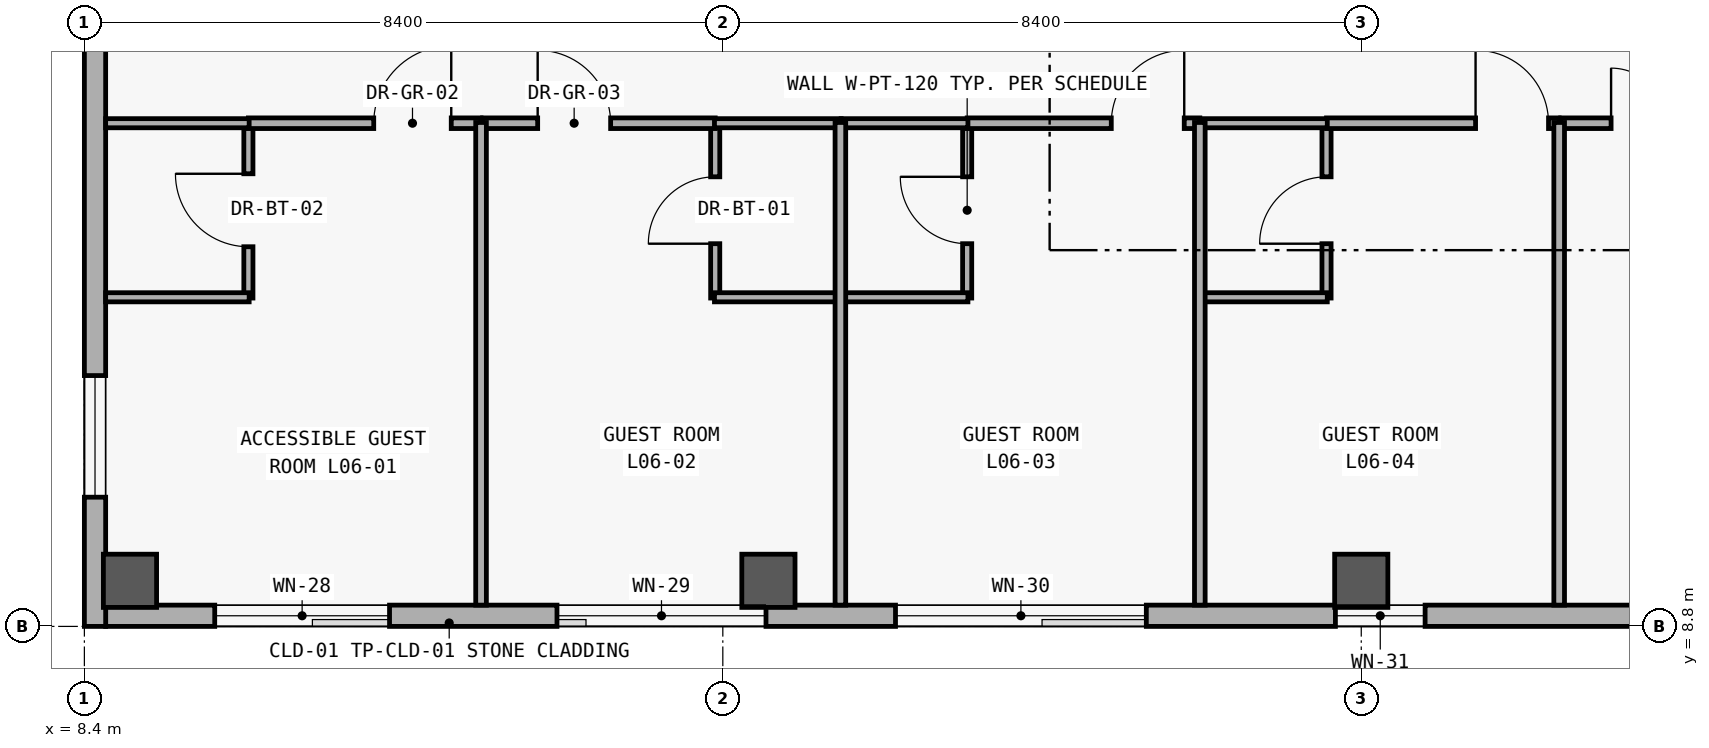
"""IFC4 building model, lengths in metres.
Left out: names, types, materials, properties, quantities, classifications, styles, units other than length and angle.
Written with IfcOpenShell. Run it as: python <this file> out.ifc"""

import sys

from ifc_helpers import new_model, si_unit, direction, frame, frame_2d, origin, origin_2d, place, context, subcontext, project, spatial, rectangle, extrude, element, fill, save


model = new_model("IFC4")
c1 = context("Model", 3, precision=1e-05, world=origin(), true_north=direction((0.0, 1.0)))
c2 = subcontext(c1, "Body", "Model", "MODEL_VIEW")
j1 = project(units=[si_unit("LENGTHUNIT", "METRE"), si_unit("PLANEANGLEUNIT", "RADIAN")], contexts=[c1])
p1 = place(None, origin())
s1 = spatial("IfcSite", under=j1, at=p1, CompositionType="ELEMENT")
p2 = place(p1, origin())
s2 = spatial("IfcBuilding", under=s1, at=p2, CompositionType="ELEMENT")
p3 = place(p2, frame((0.0, 0.0, 26.4)))
s3 = spatial("IfcBuildingStorey", under=s2, at=p3, CompositionType="ELEMENT", Elevation=26.4)
for number, where, z_axis, x_axis in (
    (1, (9.0, 9.4, 0.0), (0.0, 0.0, 1.0), (1.0, 0.0, 0.0)),
    (2, (17.4, 9.4, 0.0), (0.0, 0.0, 1.0), (1.0, 0.0, 0.0)),
    (3, (25.2, 9.4, 0.0), (0.0, 0.0, 1.0), (1.0, 0.0, 0.0)),
):
    element("IfcColumn", number, at=place(p3, frame(where, z_axis=z_axis, x_axis=x_axis)), inside=s3, PredefinedType="COLUMN", context=c2, shape_type="SweptSolid", body=[
        extrude(rectangle(XDim=0.7, YDim=0.7, at=origin_2d()), origin(), (0.0, 0.0, 1.0), 3.6),
    ])
p4 = place(p3, frame((75.32, 8.94, 0.0), z_axis=(0.0, 0.0, 1.0), x_axis=(-1.0, 0.0, 0.0)))
e4 = element("IfcWall", 4, at=p4, inside=s3, PredefinedType="SOLIDWALL", context=c2, shape_type="SweptSolid", body=[
    extrude(rectangle(XDim=66.64, YDim=0.28, at=frame_2d((33.32, 0.0))), origin(), (0.0, 0.0, 1.0), 3.32),
])
p5 = place(p4, frame((62.905, 0.0, 0.85)))
e5 = element("IfcOpeningElement", 5, at=p5, cuts=e4, PredefinedType="OPENING", context=c2, shape_type="SweptSolid", body=[
    extrude(rectangle(XDim=2.3, YDim=2.05, at=frame_2d((1.15, 1.025))), frame((0.0, 0.15, 0.0), z_axis=(0.0, -1.0, 0.0), x_axis=(1.0, 0.0, 0.0)), (0.0, 0.0, 1.0), 0.3),
])
p6 = place(p4, frame((57.952, 0.0, 0.85)))
e6 = element("IfcOpeningElement", 6, at=p6, cuts=e4, PredefinedType="OPENING", context=c2, shape_type="SweptSolid", body=[
    extrude(rectangle(XDim=2.75, YDim=2.1, at=frame_2d((1.375, 1.05))), frame((0.0, 0.15, 0.0), z_axis=(0.0, -1.0, 0.0), x_axis=(1.0, 0.0, 0.0)), (0.0, 0.0, 1.0), 0.3),
])
p7 = place(p4, frame((52.948, 0.0, 0.85)))
e7 = element("IfcOpeningElement", 7, at=p7, cuts=e4, PredefinedType="OPENING", context=c2, shape_type="SweptSolid", body=[
    extrude(rectangle(XDim=3.3, YDim=2.15, at=frame_2d((1.65, 1.075))), frame((0.0, 0.15, 0.0), z_axis=(0.0, -1.0, 0.0), x_axis=(1.0, 0.0, 0.0)), (0.0, 0.0, 1.0), 0.3),
])
p8 = place(p4, frame((49.28, 0.0, 0.85)))
e8 = element("IfcOpeningElement", 8, at=p8, cuts=e4, PredefinedType="OPENING", context=c2, shape_type="SweptSolid", body=[
    extrude(rectangle(XDim=1.18, YDim=1.5, at=frame_2d((0.59, 0.75))), frame((0.0, 0.15, 0.0), z_axis=(0.0, -1.0, 0.0), x_axis=(1.0, 0.0, 0.0)), (0.0, 0.0, 1.0), 0.3),
])
p9 = place(p4, frame((44.501, 0.0, 0.85)))
e9 = element("IfcOpeningElement", 9, at=p9, cuts=e4, PredefinedType="OPENING", context=c2, shape_type="SweptSolid", body=[
    extrude(rectangle(XDim=1.28, YDim=1.6, at=frame_2d((0.64, 0.8))), frame((0.0, 0.15, 0.0), z_axis=(0.0, -1.0, 0.0), x_axis=(1.0, 0.0, 0.0)), (0.0, 0.0, 1.0), 0.3),
])
p10 = place(p4, frame((39.723, 0.0, 0.85)))
e10 = element("IfcOpeningElement", 10, at=p10, cuts=e4, PredefinedType="OPENING", context=c2, shape_type="SweptSolid", body=[
    extrude(rectangle(XDim=1.38, YDim=1.7, at=frame_2d((0.69, 0.85))), frame((0.0, 0.15, 0.0), z_axis=(0.0, -1.0, 0.0), x_axis=(1.0, 0.0, 0.0)), (0.0, 0.0, 1.0), 0.3),
])
p11 = place(p4, frame((34.944, 0.0, 0.85)))
e11 = element("IfcOpeningElement", 11, at=p11, cuts=e4, PredefinedType="OPENING", context=c2, shape_type="SweptSolid", body=[
    extrude(rectangle(XDim=1.48, YDim=1.8, at=frame_2d((0.74, 0.9))), frame((0.0, 0.15, 0.0), z_axis=(0.0, -1.0, 0.0), x_axis=(1.0, 0.0, 0.0)), (0.0, 0.0, 1.0), 0.3),
])
p12 = place(p4, frame((30.165, 0.0, 0.85)))
e12 = element("IfcOpeningElement", 12, at=p12, cuts=e4, PredefinedType="OPENING", context=c2, shape_type="SweptSolid", body=[
    extrude(rectangle(XDim=1.58, YDim=1.85, at=frame_2d((0.79, 0.925))), frame((0.0, 0.15, 0.0), z_axis=(0.0, -1.0, 0.0), x_axis=(1.0, 0.0, 0.0)), (0.0, 0.0, 1.0), 0.3),
])
p13 = place(p4, frame((25.387, 0.0, 0.85)))
e13 = element("IfcOpeningElement", 13, at=p13, cuts=e4, PredefinedType="OPENING", context=c2, shape_type="SweptSolid", body=[
    extrude(rectangle(XDim=1.68, YDim=1.9, at=frame_2d((0.84, 0.95))), frame((0.0, 0.15, 0.0), z_axis=(0.0, -1.0, 0.0), x_axis=(1.0, 0.0, 0.0)), (0.0, 0.0, 1.0), 0.3),
])
p14 = place(p4, frame((20.608, 0.0, 0.85)))
e14 = element("IfcOpeningElement", 14, at=p14, cuts=e4, PredefinedType="OPENING", context=c2, shape_type="SweptSolid", body=[
    extrude(rectangle(XDim=1.78, YDim=1.95, at=frame_2d((0.89, 0.975))), frame((0.0, 0.15, 0.0), z_axis=(0.0, -1.0, 0.0), x_axis=(1.0, 0.0, 0.0)), (0.0, 0.0, 1.0), 0.3),
])
p15 = place(p4, frame((15.83, 0.0, 0.85)))
e15 = element("IfcOpeningElement", 15, at=p15, cuts=e4, PredefinedType="OPENING", context=c2, shape_type="SweptSolid", body=[
    extrude(rectangle(XDim=1.88, YDim=1.95, at=frame_2d((0.94, 0.975))), frame((0.0, 0.15, 0.0), z_axis=(0.0, -1.0, 0.0), x_axis=(1.0, 0.0, 0.0)), (0.0, 0.0, 1.0), 0.3),
])
p16 = place(p4, frame((11.016, 0.0, 0.85)))
e16 = element("IfcOpeningElement", 16, at=p16, cuts=e4, PredefinedType="OPENING", context=c2, shape_type="SweptSolid", body=[
    extrude(rectangle(XDim=2.05, YDim=1.95, at=frame_2d((1.025, 0.975))), frame((0.0, 0.15, 0.0), z_axis=(0.0, -1.0, 0.0), x_axis=(1.0, 0.0, 0.0)), (0.0, 0.0, 1.0), 0.3),
])
p17 = place(p4, frame((6.223, 0.0, 0.85)))
e17 = element("IfcOpeningElement", 17, at=p17, cuts=e4, PredefinedType="OPENING", context=c2, shape_type="SweptSolid", body=[
    extrude(rectangle(XDim=2.18, YDim=1.95, at=frame_2d((1.09, 0.975))), frame((0.0, 0.15, 0.0), z_axis=(0.0, -1.0, 0.0), x_axis=(1.0, 0.0, 0.0)), (0.0, 0.0, 1.0), 0.3),
])
p18 = place(p4, frame((1.394, 0.0, 0.85)))
e18 = element("IfcOpeningElement", 18, at=p18, cuts=e4, PredefinedType="OPENING", context=c2, shape_type="SweptSolid", body=[
    extrude(rectangle(XDim=2.38, YDim=1.95, at=frame_2d((1.19, 0.975))), frame((0.0, 0.15, 0.0), z_axis=(0.0, -1.0, 0.0), x_axis=(1.0, 0.0, 0.0)), (0.0, 0.0, 1.0), 0.3),
])
p19 = place(p3, frame((8.54, 8.8, 0.0), z_axis=(0.0, 0.0, 1.0), x_axis=(0.0, 1.0, 0.0)))
e19 = element("IfcWall", 19, at=p19, inside=s3, PredefinedType="SOLIDWALL", context=c2, shape_type="SweptSolid", body=[
    extrude(rectangle(XDim=25.2, YDim=0.28, at=frame_2d((12.6, 0.0))), origin(), (0.0, 0.0, 1.0), 3.32),
])
p20 = place(p19, frame((1.7, 0.0, 0.95)))
e20 = element("IfcOpeningElement", 20, at=p20, cuts=e19, PredefinedType="OPENING", context=c2, shape_type="SweptSolid", body=[
    extrude(rectangle(XDim=1.6, YDim=1.6, at=frame_2d((0.8, 0.8))), frame((0.0, 0.15, 0.0), z_axis=(0.0, -1.0, 0.0), x_axis=(1.0, 0.0, 0.0)), (0.0, 0.0, 1.0), 0.3),
])
p21 = place(p3, frame((10.558, 13.12, 0.0), z_axis=(0.0, 0.0, 1.0), x_axis=(0.0, 1.0, 0.0)))
e21 = element("IfcWall", 21, at=p21, inside=s3, PredefinedType="PARTITIONING", context=c2, shape_type="SweptSolid", body=[
    extrude(rectangle(XDim=2.31, YDim=0.12, at=frame_2d((1.155, 0.0))), origin(), (0.0, 0.0, 1.0), 2.48),
])
p22 = place(p21, frame((0.675, 0.0, 0.0)))
e22 = element("IfcOpeningElement", 22, at=p22, cuts=e21, PredefinedType="OPENING", context=c2, shape_type="SweptSolid", body=[
    extrude(rectangle(XDim=0.96, YDim=2.15, at=frame_2d((0.48, 1.075))), frame((0.0, 0.07, 0.0), z_axis=(0.0, -1.0, 0.0), x_axis=(1.0, 0.0, 0.0)), (0.0, 0.0, 1.0), 0.14),
])
p23 = place(p3, frame((16.7, 13.12, 0.0), z_axis=(0.0, 0.0, 1.0), x_axis=(0.0, 1.0, 0.0)))
e23 = element("IfcWall", 23, at=p23, inside=s3, PredefinedType="PARTITIONING", context=c2, shape_type="SweptSolid", body=[
    extrude(rectangle(XDim=2.31, YDim=0.12, at=frame_2d((1.155, 0.0))), origin(), (0.0, 0.0, 1.0), 2.48),
])
p24 = place(p23, frame((0.715, 0.0, 0.0)))
e24 = element("IfcOpeningElement", 24, at=p24, cuts=e23, PredefinedType="OPENING", context=c2, shape_type="SweptSolid", body=[
    extrude(rectangle(XDim=0.88, YDim=2.15, at=frame_2d((0.44, 1.075))), frame((0.0, 0.07, 0.0), z_axis=(0.0, -1.0, 0.0), x_axis=(1.0, 0.0, 0.0)), (0.0, 0.0, 1.0), 0.14),
])
p25 = place(p3, frame((20.015, 13.12, 0.0), z_axis=(0.0, 0.0, 1.0), x_axis=(0.0, 1.0, 0.0)))
e25 = element("IfcWall", 25, at=p25, inside=s3, PredefinedType="PARTITIONING", context=c2, shape_type="SweptSolid", body=[
    extrude(rectangle(XDim=2.31, YDim=0.12, at=frame_2d((1.155, 0.0))), origin(), (0.0, 0.0, 1.0), 2.48),
])
p26 = place(p25, frame((0.715, 0.0, 0.0)))
e26 = element("IfcOpeningElement", 26, at=p26, cuts=e25, PredefinedType="OPENING", context=c2, shape_type="SweptSolid", body=[
    extrude(rectangle(XDim=0.88, YDim=2.15, at=frame_2d((0.44, 1.075))), frame((0.0, 0.07, 0.0), z_axis=(0.0, -1.0, 0.0), x_axis=(1.0, 0.0, 0.0)), (0.0, 0.0, 1.0), 0.14),
])
p27 = place(p3, frame((24.743, 13.12, 0.0), z_axis=(0.0, 0.0, 1.0), x_axis=(0.0, 1.0, 0.0)))
e27 = element("IfcWall", 27, at=p27, inside=s3, PredefinedType="PARTITIONING", context=c2, shape_type="SweptSolid", body=[
    extrude(rectangle(XDim=2.31, YDim=0.12, at=frame_2d((1.155, 0.0))), origin(), (0.0, 0.0, 1.0), 2.48),
])
p28 = place(p27, frame((0.715, 0.0, 0.0)))
e28 = element("IfcOpeningElement", 28, at=p28, cuts=e27, PredefinedType="OPENING", context=c2, shape_type="SweptSolid", body=[
    extrude(rectangle(XDim=0.88, YDim=2.15, at=frame_2d((0.44, 1.075))), frame((0.0, 0.07, 0.0), z_axis=(0.0, -1.0, 0.0), x_axis=(1.0, 0.0, 0.0)), (0.0, 0.0, 1.0), 0.14),
])
p29 = place(p3, frame((10.558, 15.42, 0.0), z_axis=(0.0, 0.0, 1.0), x_axis=(1.0, 0.0, 0.0)))
e29 = element("IfcWall", 29, at=p29, inside=s3, PredefinedType="PARTITIONING", context=c2, shape_type="SweptSolid", body=[
    extrude(rectangle(XDim=3.061, YDim=0.14, at=frame_2d((1.53, 0.0))), origin(), (0.0, 0.0, 1.0), 2.48),
])
p30 = place(p29, frame((1.649, 0.0, 0.0)))
e30 = element("IfcOpeningElement", 30, at=p30, cuts=e29, PredefinedType="OPENING", context=c2, shape_type="SweptSolid", body=[
    extrude(rectangle(XDim=1.02, YDim=2.2, at=frame_2d((0.51, 1.1))), frame((0.0, 0.08, 0.0), z_axis=(0.0, -1.0, 0.0), x_axis=(1.0, 0.0, 0.0)), (0.0, 0.0, 1.0), 0.16),
])
p31 = place(p3, frame((13.639, 15.42, 0.0), z_axis=(0.0, 0.0, 1.0), x_axis=(1.0, 0.0, 0.0)))
e31 = element("IfcWall", 31, at=p31, inside=s3, PredefinedType="PARTITIONING", context=c2, shape_type="SweptSolid", body=[
    extrude(rectangle(XDim=3.061, YDim=0.14, at=frame_2d((1.531, 0.0))), origin(), (0.0, 0.0, 1.0), 2.48),
])
p32 = place(p31, frame((0.725, 0.0, 0.0)))
e32 = element("IfcOpeningElement", 32, at=p32, cuts=e31, PredefinedType="OPENING", context=c2, shape_type="SweptSolid", body=[
    extrude(rectangle(XDim=0.96, YDim=2.25, at=frame_2d((0.48, 1.125))), frame((0.0, 0.08, 0.0), z_axis=(0.0, -1.0, 0.0), x_axis=(1.0, 0.0, 0.0)), (0.0, 0.0, 1.0), 0.16),
])
p33 = place(p3, frame((20.015, 15.42, 0.0), z_axis=(0.0, 0.0, 1.0), x_axis=(1.0, 0.0, 0.0)))
e33 = element("IfcWall", 33, at=p33, inside=s3, PredefinedType="PARTITIONING", context=c2, shape_type="SweptSolid", body=[
    extrude(rectangle(XDim=3.061, YDim=0.14, at=frame_2d((1.531, 0.0))), origin(), (0.0, 0.0, 1.0), 2.48),
])
p34 = place(p33, frame((1.896, 0.0, 0.0)))
e34 = element("IfcOpeningElement", 34, at=p34, cuts=e33, PredefinedType="OPENING", context=c2, shape_type="SweptSolid", body=[
    extrude(rectangle(XDim=0.96, YDim=2.25, at=frame_2d((0.48, 1.125))), frame((0.0, 0.08, 0.0), z_axis=(0.0, -1.0, 0.0), x_axis=(1.0, 0.0, 0.0)), (0.0, 0.0, 1.0), 0.16),
])
p35 = place(p3, frame((24.743, 15.42, 0.0), z_axis=(0.0, 0.0, 1.0), x_axis=(1.0, 0.0, 0.0)))
e35 = element("IfcWall", 35, at=p35, inside=s3, PredefinedType="PARTITIONING", context=c2, shape_type="SweptSolid", body=[
    extrude(rectangle(XDim=3.061, YDim=0.14, at=frame_2d((1.531, 0.0))), origin(), (0.0, 0.0, 1.0), 2.48),
])
p36 = place(p35, frame((1.961, 0.0, 0.0)))
e36 = element("IfcOpeningElement", 36, at=p36, cuts=e35, PredefinedType="OPENING", context=c2, shape_type="SweptSolid", body=[
    extrude(rectangle(XDim=0.96, YDim=2.25, at=frame_2d((0.48, 1.125))), frame((0.0, 0.08, 0.0), z_axis=(0.0, -1.0, 0.0), x_axis=(1.0, 0.0, 0.0)), (0.0, 0.0, 1.0), 0.16),
])
p37 = place(p3, frame((27.824, 15.42, 0.0), z_axis=(0.0, 0.0, 1.0), x_axis=(1.0, 0.0, 0.0)))
e37 = element("IfcWall", 37, at=p37, inside=s3, PredefinedType="PARTITIONING", context=c2, shape_type="SweptSolid", body=[
    extrude(rectangle(XDim=3.061, YDim=0.14, at=frame_2d((1.531, 0.0))), origin(), (0.0, 0.0, 1.0), 2.48),
])
p38 = place(p37, frame((0.663, 0.0, 0.0)))
e38 = element("IfcOpeningElement", 38, at=p38, cuts=e37, PredefinedType="OPENING", context=c2, shape_type="SweptSolid", body=[
    extrude(rectangle(XDim=1.45, YDim=2.3, at=frame_2d((0.725, 1.15))), frame((0.0, 0.08, 0.0), z_axis=(0.0, -1.0, 0.0), x_axis=(1.0, 0.0, 0.0)), (0.0, 0.0, 1.0), 0.16),
])
for number, where, z_axis, x_axis in (
    (39, (8.68, 13.13, 0.0), (0.0, 0.0, 1.0), (1.0, 0.0, 0.0)),
    (40, (8.68, 15.42, 0.0), (0.0, 0.0, 1.0), (1.0, 0.0, 0.0)),
):
    element("IfcWall", number, at=place(p3, frame(where, z_axis=z_axis, x_axis=x_axis)), inside=s3, PredefinedType="PARTITIONING", context=c2, shape_type="SweptSolid", body=[
        extrude(rectangle(XDim=1.888, YDim=0.12, at=frame_2d((0.944, 0.0))), origin(), (0.0, 0.0, 1.0), 2.48),
    ])
for number, where, z_axis, x_axis in (
    (41, (16.69, 13.13, 0.0), (0.0, 0.0, 1.0), (1.0, 0.0, 0.0)),
    (42, (16.69, 15.42, 0.0), (0.0, 0.0, 1.0), (1.0, 0.0, 0.0)),
):
    element("IfcWall", number, at=place(p3, frame(where, z_axis=z_axis, x_axis=x_axis)), inside=s3, PredefinedType="PARTITIONING", context=c2, shape_type="SweptSolid", body=[
        extrude(rectangle(XDim=1.667, YDim=0.12, at=frame_2d((0.833, 0.0))), origin(), (0.0, 0.0, 1.0), 2.48),
    ])
for number, where, z_axis, x_axis in (
    (43, (18.357, 13.13, 0.0), (0.0, 0.0, 1.0), (1.0, 0.0, 0.0)),
    (44, (18.357, 15.42, 0.0), (0.0, 0.0, 1.0), (1.0, 0.0, 0.0)),
):
    element("IfcWall", number, at=place(p3, frame(where, z_axis=z_axis, x_axis=x_axis)), inside=s3, PredefinedType="PARTITIONING", context=c2, shape_type="SweptSolid", body=[
        extrude(rectangle(XDim=1.668, YDim=0.12, at=frame_2d((0.834, 0.0))), origin(), (0.0, 0.0, 1.0), 2.48),
    ])
for number, where, z_axis, x_axis in (
    (45, (23.086, 13.13, 0.0), (0.0, 0.0, 1.0), (1.0, 0.0, 0.0)),
    (46, (23.086, 15.42, 0.0), (0.0, 0.0, 1.0), (1.0, 0.0, 0.0)),
):
    element("IfcWall", number, at=place(p3, frame(where, z_axis=z_axis, x_axis=x_axis)), inside=s3, PredefinedType="PARTITIONING", context=c2, shape_type="SweptSolid", body=[
        extrude(rectangle(XDim=1.667, YDim=0.12, at=frame_2d((0.833, 0.0))), origin(), (0.0, 0.0, 1.0), 2.48),
    ])
for number, where, z_axis, x_axis in (
    (47, (13.619, 9.08, 0.0), (0.0, 0.0, 1.0), (0.0, 1.0, 0.0)),
    (48, (18.347, 9.08, 0.0), (0.0, 0.0, 1.0), (0.0, 1.0, 0.0)),
    (49, (23.076, 9.08, 0.0), (0.0, 0.0, 1.0), (0.0, 1.0, 0.0)),
    (50, (27.804, 9.08, 0.0), (0.0, 0.0, 1.0), (0.0, 1.0, 0.0)),
):
    element("IfcWall", number, at=place(p3, frame(where, z_axis=z_axis, x_axis=x_axis)), inside=s3, PredefinedType="PARTITIONING", context=c2, shape_type="SweptSolid", body=[
        extrude(rectangle(XDim=6.35, YDim=0.14, at=frame_2d((3.175, 0.0))), origin(), (0.0, 0.0, 1.0), 2.48),
    ])
p39 = place(p5, origin())
e51 = element("IfcWindow", 51, at=p39, inside=s3, PartitioningType="SINGLE_PANEL", PredefinedType="WINDOW", context=c2, shape_type="SweptSolid", body=[
    extrude(rectangle(XDim=2.3, YDim=2.05, at=frame_2d((1.15, 1.025))), frame((0.0, 0.03, 0.0), z_axis=(0.0, -1.0, 0.0), x_axis=(1.0, 0.0, 0.0)), (0.0, 0.0, 1.0), 0.06),
])
fill(e5, e51)
p40 = place(p6, origin())
e52 = element("IfcWindow", 52, at=p40, inside=s3, PartitioningType="SINGLE_PANEL", PredefinedType="WINDOW", context=c2, shape_type="SweptSolid", body=[
    extrude(rectangle(XDim=2.75, YDim=2.1, at=frame_2d((1.375, 1.05))), frame((0.0, 0.03, 0.0), z_axis=(0.0, -1.0, 0.0), x_axis=(1.0, 0.0, 0.0)), (0.0, 0.0, 1.0), 0.06),
])
fill(e6, e52)
p41 = place(p7, origin())
e53 = element("IfcWindow", 53, at=p41, inside=s3, PartitioningType="SINGLE_PANEL", PredefinedType="WINDOW", context=c2, shape_type="SweptSolid", body=[
    extrude(rectangle(XDim=3.3, YDim=2.15, at=frame_2d((1.65, 1.075))), frame((0.0, 0.03, 0.0), z_axis=(0.0, -1.0, 0.0), x_axis=(1.0, 0.0, 0.0)), (0.0, 0.0, 1.0), 0.06),
])
fill(e7, e53)
p42 = place(p8, origin())
e54 = element("IfcWindow", 54, at=p42, inside=s3, PartitioningType="SINGLE_PANEL", PredefinedType="WINDOW", context=c2, shape_type="SweptSolid", body=[
    extrude(rectangle(XDim=1.18, YDim=1.5, at=frame_2d((0.59, 0.75))), frame((0.0, 0.03, 0.0), z_axis=(0.0, -1.0, 0.0), x_axis=(1.0, 0.0, 0.0)), (0.0, 0.0, 1.0), 0.06),
])
fill(e8, e54)
p43 = place(p20, origin())
e55 = element("IfcWindow", 55, at=p43, inside=s3, PartitioningType="SINGLE_PANEL", PredefinedType="WINDOW", context=c2, shape_type="SweptSolid", body=[
    extrude(rectangle(XDim=1.6, YDim=1.6, at=frame_2d((0.8, 0.8))), frame((0.0, 0.03, 0.0), z_axis=(0.0, -1.0, 0.0), x_axis=(1.0, 0.0, 0.0)), (0.0, 0.0, 1.0), 0.06),
])
fill(e20, e55)
p44 = place(p22, origin())
e56 = element("IfcDoor", 56, at=p44, inside=s3, OperationType="SINGLE_SWING_RIGHT", PredefinedType="DOOR", context=c2, shape_type="SweptSolid", body=[
    extrude(rectangle(XDim=0.96, YDim=2.15, at=frame_2d((0.48, 1.075))), frame((0.0, 0.025, 0.0), z_axis=(0.0, -1.0, 0.0), x_axis=(1.0, 0.0, 0.0)), (0.0, 0.0, 1.0), 0.05),
])
fill(e22, e56)
p45 = place(p24, origin())
e57 = element("IfcDoor", 57, at=p45, inside=s3, OperationType="SINGLE_SWING_LEFT", PredefinedType="DOOR", context=c2, shape_type="SweptSolid", body=[
    extrude(rectangle(XDim=0.88, YDim=2.15, at=frame_2d((0.44, 1.075))), frame((0.0, 0.025, 0.0), z_axis=(0.0, -1.0, 0.0), x_axis=(1.0, 0.0, 0.0)), (0.0, 0.0, 1.0), 0.05),
])
fill(e24, e57)
p46 = place(p26, origin())
e58 = element("IfcDoor", 58, at=p46, inside=s3, OperationType="SINGLE_SWING_RIGHT", PredefinedType="DOOR", context=c2, shape_type="SweptSolid", body=[
    extrude(rectangle(XDim=0.88, YDim=2.15, at=frame_2d((0.44, 1.075))), frame((0.0, 0.025, 0.0), z_axis=(0.0, -1.0, 0.0), x_axis=(1.0, 0.0, 0.0)), (0.0, 0.0, 1.0), 0.05),
])
fill(e26, e58)
p47 = place(p28, origin())
e59 = element("IfcDoor", 59, at=p47, inside=s3, OperationType="SINGLE_SWING_LEFT", PredefinedType="DOOR", context=c2, shape_type="SweptSolid", body=[
    extrude(rectangle(XDim=0.88, YDim=2.15, at=frame_2d((0.44, 1.075))), frame((0.0, 0.025, 0.0), z_axis=(0.0, -1.0, 0.0), x_axis=(1.0, 0.0, 0.0)), (0.0, 0.0, 1.0), 0.05),
])
fill(e28, e59)
p48 = place(p30, origin())
e60 = element("IfcDoor", 60, at=p48, inside=s3, OperationType="SINGLE_SWING_RIGHT", PredefinedType="DOOR", context=c2, shape_type="SweptSolid", body=[
    extrude(rectangle(XDim=1.02, YDim=2.2, at=frame_2d((0.51, 1.1))), frame((0.0, 0.025, 0.0), z_axis=(0.0, -1.0, 0.0), x_axis=(1.0, 0.0, 0.0)), (0.0, 0.0, 1.0), 0.05),
])
fill(e30, e60)
p49 = place(p32, origin())
e61 = element("IfcDoor", 61, at=p49, inside=s3, OperationType="SINGLE_SWING_LEFT", PredefinedType="DOOR", context=c2, shape_type="SweptSolid", body=[
    extrude(rectangle(XDim=0.96, YDim=2.25, at=frame_2d((0.48, 1.125))), frame((0.0, 0.025, 0.0), z_axis=(0.0, -1.0, 0.0), x_axis=(1.0, 0.0, 0.0)), (0.0, 0.0, 1.0), 0.05),
])
fill(e32, e61)
p50 = place(p34, origin())
e62 = element("IfcDoor", 62, at=p50, inside=s3, OperationType="SINGLE_SWING_RIGHT", PredefinedType="DOOR", context=c2, shape_type="SweptSolid", body=[
    extrude(rectangle(XDim=0.96, YDim=2.25, at=frame_2d((0.48, 1.125))), frame((0.0, 0.025, 0.0), z_axis=(0.0, -1.0, 0.0), x_axis=(1.0, 0.0, 0.0)), (0.0, 0.0, 1.0), 0.05),
])
fill(e34, e62)
p51 = place(p36, origin())
e63 = element("IfcDoor", 63, at=p51, inside=s3, OperationType="SINGLE_SWING_LEFT", PredefinedType="DOOR", context=c2, shape_type="SweptSolid", body=[
    extrude(rectangle(XDim=0.96, YDim=2.25, at=frame_2d((0.48, 1.125))), frame((0.0, 0.025, 0.0), z_axis=(0.0, -1.0, 0.0), x_axis=(1.0, 0.0, 0.0)), (0.0, 0.0, 1.0), 0.05),
])
fill(e36, e63)
p52 = place(p38, origin())
e64 = element("IfcDoor", 64, at=p52, inside=s3, OperationType="DOUBLE_DOOR_SINGLE_SWING", PredefinedType="DOOR", context=c2, shape_type="SweptSolid", body=[
    extrude(rectangle(XDim=1.45, YDim=2.3, at=frame_2d((0.725, 1.15))), frame((0.0, 0.025, 0.0), z_axis=(0.0, -1.0, 0.0), x_axis=(1.0, 0.0, 0.0)), (0.0, 0.0, 1.0), 0.05),
])
fill(e38, e64)
save(model, sys.argv[1])
